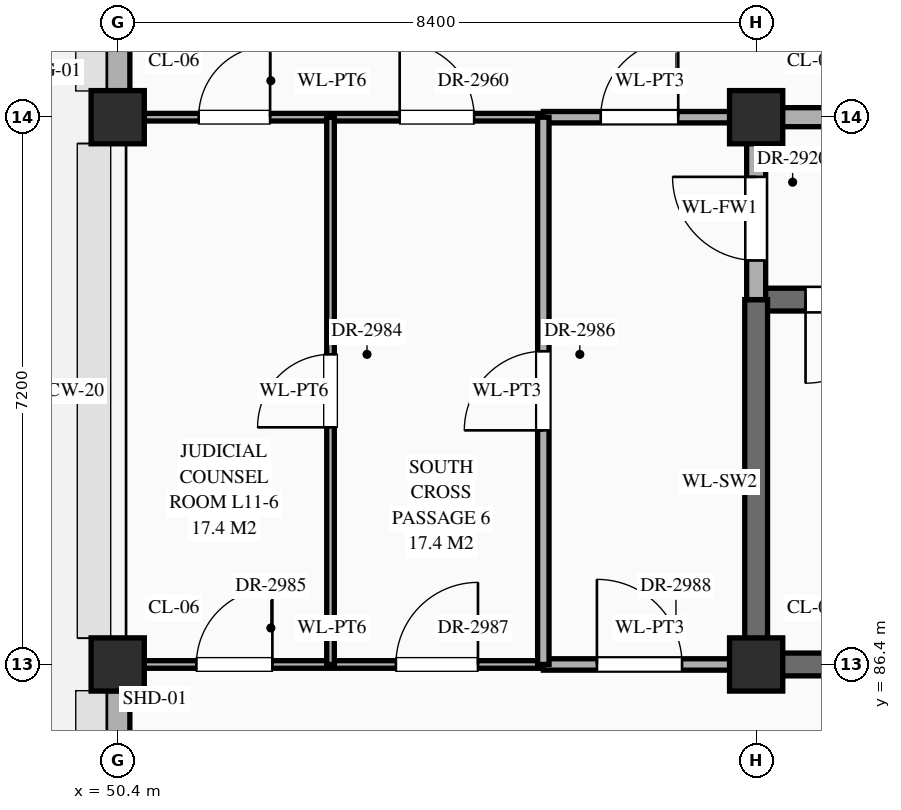
"""IFC4 building model, lengths in metres.
Left out: names, types, materials, properties, quantities, classifications, styles, units other than length and angle.
Written with IfcOpenShell. Run it as: python <this file> out.ifc"""

import sys

from ifc_helpers import new_model, si_unit, direction, frame, frame_2d, origin, origin_2d, place, context, subcontext, project, spatial, rectangle, extrude, element, fill, save


model = new_model("IFC4")
c1 = context("Model", 3, precision=1e-05, world=origin(), true_north=direction((0.0, 1.0)))
c2 = subcontext(c1, "Body", "Model", "MODEL_VIEW")
j1 = project(units=[si_unit("LENGTHUNIT", "METRE"), si_unit("PLANEANGLEUNIT", "RADIAN")], contexts=[c1])
p1 = place(None, origin())
s1 = spatial("IfcSite", under=j1, at=p1, CompositionType="ELEMENT")
p2 = place(p1, origin())
s2 = spatial("IfcBuilding", under=s1, at=p2, CompositionType="ELEMENT")
p3 = place(p2, frame((0.0, 0.0, 47.7)))
s3 = spatial("IfcBuildingStorey", under=s2, at=p3, CompositionType="ELEMENT", Elevation=47.7)
for number, where, z_axis, x_axis in (
    (1, (50.4, 86.4, 0.0), (0.0, 0.0, 1.0), (1.0, 0.0, 0.0)),
    (2, (50.4, 93.6, 0.0), (0.0, 0.0, 1.0), (1.0, 0.0, 0.0)),
    (3, (58.8, 86.4, 0.0), (0.0, 0.0, 1.0), (1.0, 0.0, 0.0)),
    (4, (58.8, 93.6, 0.0), (0.0, 0.0, 1.0), (1.0, 0.0, 0.0)),
):
    element("IfcColumn", number, at=place(p3, frame(where, z_axis=z_axis, x_axis=x_axis)), inside=s3, PredefinedType="COLUMN", context=c2, shape_type="SweptSolid", body=[
        extrude(rectangle(XDim=0.7, YDim=0.7, at=origin_2d()), origin(), (0.0, 0.0, 1.0), 4.2),
    ])
p4 = place(p3, frame((50.4, 79.545, 0.0), z_axis=(0.0, 0.0, 1.0), x_axis=(0.0, 1.0, 0.0)))
e5 = element("IfcWall", 5, at=p4, inside=s3, PredefinedType="STANDARD", context=c2, shape_type="SweptSolid", body=[
    extrude(rectangle(XDim=6.51, YDim=0.32, at=frame_2d((3.255, 0.0))), origin(), (0.0, 0.0, 1.0), 3.31),
])
p5 = place(p4, frame((1.605, 0.0, 0.55)))
e6 = element("IfcOpeningElement", 6, at=p5, cuts=e5, PredefinedType="OPENING", context=c2, shape_type="SweptSolid", body=[
    extrude(rectangle(XDim=0.9, YDim=1.92, at=frame_2d((0.45, 0.96))), frame((0.0, 0.172, 0.0), z_axis=(0.0, -1.0, 0.0), x_axis=(1.0, 0.0, 0.0)), (0.0, 0.0, 1.0), 0.344),
])
p6 = place(p3, frame((50.4, 93.945, 0.0), z_axis=(0.0, 0.0, 1.0), x_axis=(0.0, 1.0, 0.0)))
e7 = element("IfcWall", 7, at=p6, inside=s3, PredefinedType="STANDARD", context=c2, shape_type="SweptSolid", body=[
    extrude(rectangle(XDim=6.51, YDim=0.32, at=frame_2d((3.255, 0.0))), origin(), (0.0, 0.0, 1.0), 3.31),
])
p7 = place(p6, frame((3.88, 0.0, 0.55)))
e8 = element("IfcOpeningElement", 8, at=p7, cuts=e7, PredefinedType="OPENING", context=c2, shape_type="SweptSolid", body=[
    extrude(rectangle(XDim=1.35, YDim=1.2, at=frame_2d((0.675, 0.6))), frame((0.0, 0.172, 0.0), z_axis=(0.0, -1.0, 0.0), x_axis=(1.0, 0.0, 0.0)), (0.0, 0.0, 1.0), 0.344),
])
p8 = place(p3, frame((50.44, 86.4, 0.0), z_axis=(0.0, 0.0, 1.0), x_axis=(1.0, 0.0, 0.0)))
e9 = element("IfcWall", 9, at=p8, inside=s3, PredefinedType="STANDARD", context=c2, shape_type="SweptSolid", body=[
    extrude(rectangle(XDim=5.56, YDim=0.1, at=frame_2d((2.78, 0.0))), origin(), (0.0, 0.0, 1.0), 3.11),
])
p9 = place(p8, frame((0.995, 0.0, 0.0)))
e10 = element("IfcOpeningElement", 10, at=p9, cuts=e9, PredefinedType="OPENING", context=c2, shape_type="SweptSolid", body=[
    extrude(rectangle(XDim=1.0, YDim=2.25, at=frame_2d((0.5, 1.125))), frame((0.0, 0.062, 0.0), z_axis=(0.0, -1.0, 0.0), x_axis=(1.0, 0.0, 0.0)), (0.0, 0.0, 1.0), 0.124),
])
p10 = place(p8, frame((3.62, 0.0, 0.0)))
e11 = element("IfcOpeningElement", 11, at=p10, cuts=e9, PredefinedType="OPENING", context=c2, shape_type="SweptSolid", body=[
    extrude(rectangle(XDim=1.08, YDim=2.25, at=frame_2d((0.54, 1.125))), frame((0.0, 0.062, 0.0), z_axis=(0.0, -1.0, 0.0), x_axis=(1.0, 0.0, 0.0)), (0.0, 0.0, 1.0), 0.124),
])
p11 = place(p3, frame((56.0, 86.4, 0.0), z_axis=(0.0, 0.0, 1.0), x_axis=(1.0, 0.0, 0.0)))
e12 = element("IfcWall", 12, at=p11, inside=s3, PredefinedType="STANDARD", context=c2, shape_type="SweptSolid", body=[
    extrude(rectangle(XDim=2.8, YDim=0.15, at=frame_2d((1.4, 0.0))), origin(), (0.0, 0.0, 1.0), 3.11),
])
p12 = place(p11, frame((0.705, 0.0, 0.0)))
e13 = element("IfcOpeningElement", 13, at=p12, cuts=e12, PredefinedType="OPENING", context=c2, shape_type="SweptSolid", body=[
    extrude(rectangle(XDim=1.12, YDim=2.25, at=frame_2d((0.56, 1.125))), frame((0.0, 0.087, 0.0), z_axis=(0.0, -1.0, 0.0), x_axis=(1.0, 0.0, 0.0)), (0.0, 0.0, 1.0), 0.174),
])
p13 = place(p3, frame((58.8, 86.4, 0.0), z_axis=(0.0, 0.0, 1.0), x_axis=(1.0, 0.0, 0.0)))
e14 = element("IfcWall", 14, at=p13, inside=s3, PredefinedType="SHEAR", context=c2, shape_type="SweptSolid", body=[
    extrude(rectangle(XDim=8.4, YDim=0.3, at=frame_2d((4.2, 0.0))), origin(), (0.0, 0.0, 1.0), 3.96),
])
p14 = place(p3, frame((58.8, 91.2, 0.0), z_axis=(0.0, 0.0, 1.0), x_axis=(1.0, 0.0, 0.0)))
e15 = element("IfcWall", 15, at=p14, inside=s3, PredefinedType="SHEAR", context=c2, shape_type="SweptSolid", body=[
    extrude(rectangle(XDim=8.4, YDim=0.3, at=frame_2d((4.2, 0.0))), origin(), (0.0, 0.0, 1.0), 3.96),
])
p15 = place(p14, frame((0.65, 0.0, 0.0)))
e16 = element("IfcOpeningElement", 16, at=p15, cuts=e15, PredefinedType="OPENING", context=c2, shape_type="SweptSolid", body=[
    extrude(rectangle(XDim=1.1, YDim=2.2, at=frame_2d((0.55, 1.1))), frame((0.0, 0.162, 0.0), z_axis=(0.0, -1.0, 0.0), x_axis=(1.0, 0.0, 0.0)), (0.0, 0.0, 1.0), 0.324),
])
p16 = place(p3, frame((50.44, 93.6, 0.0), z_axis=(0.0, 0.0, 1.0), x_axis=(1.0, 0.0, 0.0)))
e17 = element("IfcWall", 17, at=p16, inside=s3, PredefinedType="STANDARD", context=c2, shape_type="SweptSolid", body=[
    extrude(rectangle(XDim=5.56, YDim=0.1, at=frame_2d((2.78, 0.0))), origin(), (0.0, 0.0, 1.0), 3.11),
])
p17 = place(p16, frame((1.025, 0.0, 0.0)))
e18 = element("IfcOpeningElement", 18, at=p17, cuts=e17, PredefinedType="OPENING", context=c2, shape_type="SweptSolid", body=[
    extrude(rectangle(XDim=0.94, YDim=2.3, at=frame_2d((0.47, 1.15))), frame((0.0, 0.062, 0.0), z_axis=(0.0, -1.0, 0.0), x_axis=(1.0, 0.0, 0.0)), (0.0, 0.0, 1.0), 0.124),
])
p18 = place(p16, frame((3.67, 0.0, 0.0)))
e19 = element("IfcOpeningElement", 19, at=p18, cuts=e17, PredefinedType="OPENING", context=c2, shape_type="SweptSolid", body=[
    extrude(rectangle(XDim=0.98, YDim=2.35, at=frame_2d((0.49, 1.175))), frame((0.0, 0.062, 0.0), z_axis=(0.0, -1.0, 0.0), x_axis=(1.0, 0.0, 0.0)), (0.0, 0.0, 1.0), 0.124),
])
p19 = place(p3, frame((56.0, 93.6, 0.0), z_axis=(0.0, 0.0, 1.0), x_axis=(1.0, 0.0, 0.0)))
e20 = element("IfcWall", 20, at=p19, inside=s3, PredefinedType="STANDARD", context=c2, shape_type="SweptSolid", body=[
    extrude(rectangle(XDim=2.8, YDim=0.15, at=frame_2d((1.4, 0.0))), origin(), (0.0, 0.0, 1.0), 3.11),
])
p20 = place(p19, frame((0.755, 0.0, 0.0)))
e21 = element("IfcOpeningElement", 21, at=p20, cuts=e20, PredefinedType="OPENING", context=c2, shape_type="SweptSolid", body=[
    extrude(rectangle(XDim=1.02, YDim=2.4, at=frame_2d((0.51, 1.2))), frame((0.0, 0.087, 0.0), z_axis=(0.0, -1.0, 0.0), x_axis=(1.0, 0.0, 0.0)), (0.0, 0.0, 1.0), 0.174),
])
p21 = place(p3, frame((58.8, 93.6, 0.0), z_axis=(0.0, 0.0, 1.0), x_axis=(1.0, 0.0, 0.0)))
e22 = element("IfcWall", 22, at=p21, inside=s3, PredefinedType="STANDARD", context=c2, shape_type="SweptSolid", body=[
    extrude(rectangle(XDim=8.4, YDim=0.25, at=frame_2d((4.2, 0.0))), origin(), (0.0, 0.0, 1.0), 3.11),
])
p22 = place(p21, frame((3.45, 0.0, 0.0)))
e23 = element("IfcOpeningElement", 23, at=p22, cuts=e22, PredefinedType="OPENING", context=c2, shape_type="SweptSolid", body=[
    extrude(rectangle(XDim=1.5, YDim=2.25, at=frame_2d((0.75, 1.125))), frame((0.0, 0.137, 0.0), z_axis=(0.0, -1.0, 0.0), x_axis=(1.0, 0.0, 0.0)), (0.0, 0.0, 1.0), 0.274),
])
p23 = place(p3, frame((53.2, 86.4, 0.0), z_axis=(0.0, 0.0, 1.0), x_axis=(0.0, 1.0, 0.0)))
e24 = element("IfcWall", 24, at=p23, inside=s3, PredefinedType="STANDARD", context=c2, shape_type="SweptSolid", body=[
    extrude(rectangle(XDim=7.2, YDim=0.1, at=frame_2d((3.6, 0.0))), origin(), (0.0, 0.0, 1.0), 3.96),
])
p24 = place(p23, frame((3.12, 0.0, 0.0)))
e25 = element("IfcOpeningElement", 25, at=p24, cuts=e24, PredefinedType="OPENING", context=c2, shape_type="SweptSolid", body=[
    extrude(rectangle(XDim=0.96, YDim=2.2, at=frame_2d((0.48, 1.1))), frame((0.0, 0.062, 0.0), z_axis=(0.0, -1.0, 0.0), x_axis=(1.0, 0.0, 0.0)), (0.0, 0.0, 1.0), 0.124),
])
p25 = place(p3, frame((56.0, 86.4, 0.0), z_axis=(0.0, 0.0, 1.0), x_axis=(0.0, 1.0, 0.0)))
e26 = element("IfcWall", 26, at=p25, inside=s3, PredefinedType="STANDARD", context=c2, shape_type="SweptSolid", body=[
    extrude(rectangle(XDim=7.2, YDim=0.15, at=frame_2d((3.6, 0.0))), origin(), (0.0, 0.0, 1.0), 3.96),
])
p26 = place(p25, frame((3.08, 0.0, 0.0)))
e27 = element("IfcOpeningElement", 27, at=p26, cuts=e26, PredefinedType="OPENING", context=c2, shape_type="SweptSolid", body=[
    extrude(rectangle(XDim=1.04, YDim=2.2, at=frame_2d((0.52, 1.1))), frame((0.0, 0.087, 0.0), z_axis=(0.0, -1.0, 0.0), x_axis=(1.0, 0.0, 0.0)), (0.0, 0.0, 1.0), 0.174),
])
p27 = place(p3, frame((58.8, 86.4, 0.0), z_axis=(0.0, 0.0, 1.0), x_axis=(0.0, 1.0, 0.0)))
e28 = element("IfcWall", 28, at=p27, inside=s3, PredefinedType="SHEAR", context=c2, shape_type="SweptSolid", body=[
    extrude(rectangle(XDim=4.8, YDim=0.3, at=frame_2d((2.4, 0.0))), origin(), (0.0, 0.0, 1.0), 3.96),
])
p28 = place(p3, frame((58.8, 91.2, 0.0), z_axis=(0.0, 0.0, 1.0), x_axis=(0.0, 1.0, 0.0)))
e29 = element("IfcWall", 29, at=p28, inside=s3, PredefinedType="STANDARD", context=c2, shape_type="SweptSolid", body=[
    extrude(rectangle(XDim=2.4, YDim=0.25, at=frame_2d((1.2, 0.0))), origin(), (0.0, 0.0, 1.0), 3.21),
])
p29 = place(p28, frame((0.515, 0.0, 0.0)))
e30 = element("IfcOpeningElement", 30, at=p29, cuts=e29, PredefinedType="OPENING", context=c2, shape_type="SweptSolid", body=[
    extrude(rectangle(XDim=1.1, YDim=2.2, at=frame_2d((0.55, 1.1))), frame((0.0, 0.137, 0.0), z_axis=(0.0, -1.0, 0.0), x_axis=(1.0, 0.0, 0.0)), (0.0, 0.0, 1.0), 0.274),
])
p30 = place(p15, frame((1.1, 0.0, 0.0), z_axis=(0.0, 0.0, 1.0), x_axis=(-1.0, 0.0, 0.0)))
e31 = element("IfcDoor", 31, at=p30, inside=s3, OperationType="SINGLE_SWING_RIGHT", PredefinedType="DOOR", context=c2, shape_type="SweptSolid", body=[
    extrude(rectangle(XDim=1.1, YDim=2.2, at=frame_2d((0.55, 1.1))), frame((0.0, 0.025, 0.0), z_axis=(0.0, -1.0, 0.0), x_axis=(1.0, 0.0, 0.0)), (0.0, 0.0, 1.0), 0.05),
])
fill(e16, e31)
p31 = place(p29, origin())
e32 = element("IfcDoor", 32, at=p31, inside=s3, OperationType="SINGLE_SWING_RIGHT", PredefinedType="DOOR", context=c2, shape_type="SweptSolid", body=[
    extrude(rectangle(XDim=1.1, YDim=2.2, at=frame_2d((0.55, 1.1))), frame((0.0, 0.025, 0.0), z_axis=(0.0, -1.0, 0.0), x_axis=(1.0, 0.0, 0.0)), (0.0, 0.0, 1.0), 0.05),
])
fill(e30, e32)
p32 = place(p17, origin())
e33 = element("IfcDoor", 33, at=p32, inside=s3, OperationType="SINGLE_SWING_RIGHT", PredefinedType="DOOR", context=c2, shape_type="SweptSolid", body=[
    extrude(rectangle(XDim=0.94, YDim=2.3, at=frame_2d((0.47, 1.15))), frame((0.0, 0.025, 0.0), z_axis=(0.0, -1.0, 0.0), x_axis=(1.0, 0.0, 0.0)), (0.0, 0.0, 1.0), 0.05),
])
fill(e18, e33)
p33 = place(p18, origin())
e34 = element("IfcDoor", 34, at=p33, inside=s3, OperationType="SINGLE_SWING_LEFT", PredefinedType="DOOR", context=c2, shape_type="SweptSolid", body=[
    extrude(rectangle(XDim=0.98, YDim=2.35, at=frame_2d((0.49, 1.175))), frame((0.0, 0.025, 0.0), z_axis=(0.0, -1.0, 0.0), x_axis=(1.0, 0.0, 0.0)), (0.0, 0.0, 1.0), 0.05),
])
fill(e19, e34)
p34 = place(p20, origin())
e35 = element("IfcDoor", 35, at=p34, inside=s3, OperationType="SINGLE_SWING_RIGHT", PredefinedType="DOOR", context=c2, shape_type="SweptSolid", body=[
    extrude(rectangle(XDim=1.02, YDim=2.4, at=frame_2d((0.51, 1.2))), frame((0.0, 0.025, 0.0), z_axis=(0.0, -1.0, 0.0), x_axis=(1.0, 0.0, 0.0)), (0.0, 0.0, 1.0), 0.05),
])
fill(e21, e35)
p35 = place(p24, origin())
e36 = element("IfcDoor", 36, at=p35, inside=s3, OperationType="SINGLE_SWING_LEFT", PredefinedType="DOOR", context=c2, shape_type="SweptSolid", body=[
    extrude(rectangle(XDim=0.96, YDim=2.2, at=frame_2d((0.48, 1.1))), frame((0.0, 0.025, 0.0), z_axis=(0.0, -1.0, 0.0), x_axis=(1.0, 0.0, 0.0)), (0.0, 0.0, 1.0), 0.05),
])
fill(e25, e36)
p36 = place(p9, origin())
e37 = element("IfcDoor", 37, at=p36, inside=s3, OperationType="SINGLE_SWING_RIGHT", PredefinedType="DOOR", context=c2, shape_type="SweptSolid", body=[
    extrude(rectangle(XDim=1.0, YDim=2.25, at=frame_2d((0.5, 1.125))), frame((0.0, 0.025, 0.0), z_axis=(0.0, -1.0, 0.0), x_axis=(1.0, 0.0, 0.0)), (0.0, 0.0, 1.0), 0.05),
])
fill(e10, e37)
p37 = place(p26, origin())
e38 = element("IfcDoor", 38, at=p37, inside=s3, OperationType="SINGLE_SWING_LEFT", PredefinedType="DOOR", context=c2, shape_type="SweptSolid", body=[
    extrude(rectangle(XDim=1.04, YDim=2.2, at=frame_2d((0.52, 1.1))), frame((0.0, 0.025, 0.0), z_axis=(0.0, -1.0, 0.0), x_axis=(1.0, 0.0, 0.0)), (0.0, 0.0, 1.0), 0.05),
])
fill(e27, e38)
p38 = place(p10, origin())
e39 = element("IfcDoor", 39, at=p38, inside=s3, OperationType="SINGLE_SWING_RIGHT", PredefinedType="DOOR", context=c2, shape_type="SweptSolid", body=[
    extrude(rectangle(XDim=1.08, YDim=2.25, at=frame_2d((0.54, 1.125))), frame((0.0, 0.025, 0.0), z_axis=(0.0, -1.0, 0.0), x_axis=(1.0, 0.0, 0.0)), (0.0, 0.0, 1.0), 0.05),
])
fill(e11, e39)
p39 = place(p12, origin())
e40 = element("IfcDoor", 40, at=p39, inside=s3, OperationType="SINGLE_SWING_LEFT", PredefinedType="DOOR", context=c2, shape_type="SweptSolid", body=[
    extrude(rectangle(XDim=1.12, YDim=2.25, at=frame_2d((0.56, 1.125))), frame((0.0, 0.025, 0.0), z_axis=(0.0, -1.0, 0.0), x_axis=(1.0, 0.0, 0.0)), (0.0, 0.0, 1.0), 0.05),
])
fill(e13, e40)
save(model, sys.argv[1])
